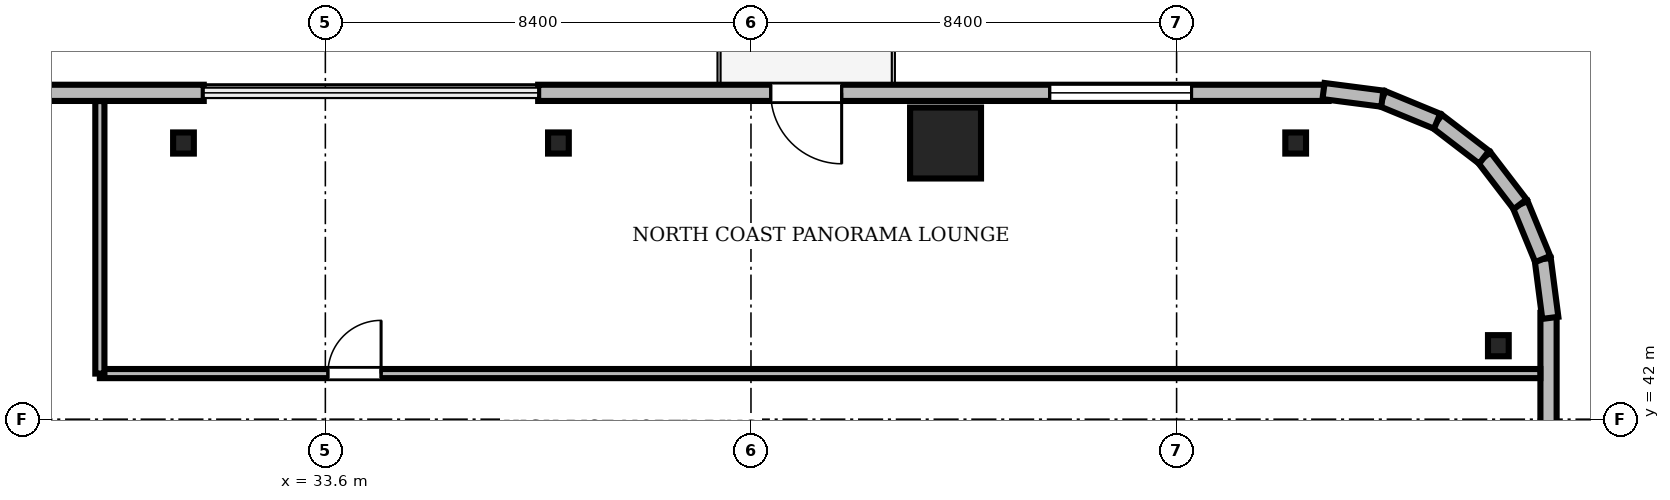
"""IFC4 building model, lengths in metres.
Left out: names, types, materials, properties, quantities, classifications, styles, units other than length and angle.
Written with IfcOpenShell. Run it as: python <this file> out.ifc"""

import sys

from ifc_helpers import new_model, si_unit, direction, frame, frame_2d, origin, origin_2d, place, context, subcontext, project, spatial, rectangle, i_section, extrude, source, transform, mapped, element, fill, save


model = new_model("IFC4")
c1 = context("Model", 3, precision=1e-05, world=origin(), true_north=direction((0.0, 1.0)))
c2 = subcontext(c1, "Body", "Model", "MODEL_VIEW")
j1 = project(units=[si_unit("LENGTHUNIT", "METRE"), si_unit("PLANEANGLEUNIT", "RADIAN")], contexts=[c1])
p1 = place(None, origin())
s1 = spatial("IfcSite", under=j1, at=p1, CompositionType="ELEMENT")
p2 = place(p1, origin())
s2 = spatial("IfcBuilding", under=s1, at=p2, CompositionType="ELEMENT")
p3 = place(p2, frame((0.0, 0.0, 218.55)))
s3 = spatial("IfcBuildingStorey", under=s2, at=p3, CompositionType="ELEMENT", Elevation=218.55)
m1 = source(origin(), c2, "Body", "SweptSolid", [
    extrude(rectangle(XDim=1.4, YDim=1.4, at=origin_2d()), origin(), (0.0, 0.0, 1.0), 3.53),
])
p4 = place(p3, frame((45.84, 47.45, 0.0), z_axis=(0.0, 0.0, 1.0), x_axis=(1.0, 0.0, 0.0)))
e1 = element("IfcColumn", 1, at=p4, inside=s3, PredefinedType="COLUMN", context=c2, shape_type="MappedRepresentation", body=[
    mapped(m1, transform((0.0, 0.0, 0.0), scale=1.0)),
])
m2 = source(origin(), c2, "Body", "SweptSolid", [
    extrude(i_section(OverallWidth=0.409, OverallDepth=0.417, WebThickness=0.021, FlangeThickness=0.033, FilletRadius=0.015, at=origin_2d()), origin(), (0.0, 0.0, 1.0), 3.53),
])
for number, where, z_axis, x_axis in (
    (2, (56.75, 43.45, 0.0), (0.0, 0.0, 1.0), (1.0, 0.0, 0.0)),
    (3, (52.75, 47.45, 0.0), (0.0, 0.0, 1.0), (1.0, 0.0, 0.0)),
    (4, (38.2, 47.45, 0.0), (0.0, 0.0, 1.0), (1.0, 0.0, 0.0)),
    (5, (30.8, 47.45, 0.0), (0.0, 0.0, 1.0), (1.0, 0.0, 0.0)),
):
    element("IfcColumn", number, at=place(p3, frame(where, z_axis=z_axis, x_axis=x_axis)), inside=s3, PredefinedType="COLUMN", context=c2, shape_type="MappedRepresentation", body=[
        mapped(m2, transform((0.0, 0.0, 0.0), scale=1.0)),
    ])
m3 = source(origin(), c2, "Body", "SweptSolid", [
    extrude(rectangle(XDim=15.6, YDim=0.32, at=frame_2d((7.8, 0.0))), origin(), (0.0, 0.0, 1.0), 3.53),
])
p5 = place(p3, frame((53.4, 48.44, 0.0), z_axis=(0.0, 0.0, 1.0), x_axis=(-1.0, 0.0, 0.0)))
e6 = element("IfcWall", 6, at=p5, inside=s3, PredefinedType="SOLIDWALL", context=c2, shape_type="MappedRepresentation", body=[
    mapped(m3, transform((0.0, 0.0, 0.0), scale=1.0)),
])
m4 = source(origin(), c2, "Body", "SweptSolid", [
    extrude(rectangle(XDim=1.4, YDim=2.3, at=frame_2d((0.7, 1.15))), frame((0.0, 0.17, 0.0), z_axis=(0.0, -1.0, 0.0), x_axis=(1.0, 0.0, 0.0)), (0.0, 0.0, 1.0), 0.34),
])
p6 = place(p5, frame((9.61, 0.0, 0.0)))
e7 = element("IfcOpeningElement", 7, at=p6, cuts=e6, PredefinedType="OPENING", context=c2, shape_type="MappedRepresentation", body=[
    mapped(m4, transform((0.0, 0.0, 0.0), scale=1.0)),
])
m5 = source(origin(), c2, "Body", "SweptSolid", [
    extrude(rectangle(XDim=2.8, YDim=2.4, at=frame_2d((1.4, 1.2))), frame((0.0, 0.17, 0.0), z_axis=(0.0, -1.0, 0.0), x_axis=(1.0, 0.0, 0.0)), (0.0, 0.0, 1.0), 0.34),
])
p7 = place(p5, frame((2.705, 0.0, 0.72)))
e8 = element("IfcOpeningElement", 8, at=p7, cuts=e6, PredefinedType="OPENING", context=c2, shape_type="MappedRepresentation", body=[
    mapped(m5, transform((0.0, 0.0, 0.0), scale=1.0)),
])
p8 = place(p3, frame((31.2, 48.44, 0.0), z_axis=(0.0, 0.0, 1.0), x_axis=(-1.0, 0.0, 0.0)))
e9 = element("IfcWall", 9, at=p8, inside=s3, PredefinedType="SOLIDWALL", context=c2, shape_type="MappedRepresentation", body=[
    mapped(m3, transform((0.0, 0.0, 0.0), scale=1.0)),
])
p9 = place(p8, frame((10.095, 0.0, 0.72)))
e10 = element("IfcOpeningElement", 10, at=p9, cuts=e9, PredefinedType="OPENING", context=c2, shape_type="MappedRepresentation", body=[
    mapped(m5, transform((0.0, 0.0, 0.0), scale=1.0)),
])
m6 = source(origin(), c2, "Body", "SweptSolid", [
    extrude(rectangle(XDim=15.6, YDim=0.32, at=frame_2d((7.8, 0.0))), origin(), (0.0, 0.0, 1.0), 3.53),
])
p10 = place(p3, frame((57.74, 28.5, 0.0), z_axis=(0.0, 0.0, 1.0), x_axis=(0.0, 1.0, 0.0)))
e11 = element("IfcWall", 11, at=p10, inside=s3, PredefinedType="SOLIDWALL", context=c2, shape_type="MappedRepresentation", body=[
    mapped(m6, transform((0.0, 0.0, 0.0), scale=1.0)),
])
p11 = place(p10, frame((10.095, 0.0, 0.72)))
e12 = element("IfcOpeningElement", 12, at=p11, cuts=e11, PredefinedType="OPENING", context=c2, shape_type="MappedRepresentation", body=[
    mapped(m5, transform((0.0, 0.0, 0.0), scale=1.0)),
])
m7 = source(origin(), c2, "Body", "SweptSolid", [
    extrude(rectangle(XDim=1.17, YDim=0.32, at=frame_2d((0.585, 0.0))), origin(), (0.0, 0.0, 1.0), 3.53),
])
p12 = place(p3, frame((57.776, 44.0, 0.0), z_axis=(0.0, 0.0, 1.0), x_axis=(-0.128295670475, 0.991735963317, 0.0)))
e13 = element("IfcWall", 13, at=p12, inside=s3, PredefinedType="SOLIDWALL", context=c2, shape_type="MappedRepresentation", body=[
    mapped(m7, transform((0.0, 0.0, 0.0), scale=1.0)),
])
m8 = source(origin(), c2, "Body", "SweptSolid", [
    extrude(rectangle(XDim=1.169, YDim=0.32, at=frame_2d((0.584, 0.0))), origin(), (0.0, 0.0, 1.0), 3.53),
])
p13 = place(p3, frame((57.625, 45.16, 0.0), z_axis=(0.0, 0.0, 1.0), x_axis=(-0.381054331552, 0.924552646638, 0.0)))
e14 = element("IfcWall", 14, at=p13, inside=s3, PredefinedType="SOLIDWALL", context=c2, shape_type="MappedRepresentation", body=[
    mapped(m8, transform((0.0, 0.0, 0.0), scale=1.0)),
])
m9 = source(origin(), c2, "Body", "SweptSolid", [
    extrude(rectangle(XDim=1.169, YDim=0.32, at=frame_2d((0.584, 0.0))), origin(), (0.0, 0.0, 1.0), 3.53),
])
p14 = place(p3, frame((57.18, 46.241, 0.0), z_axis=(0.0, 0.0, 1.0), x_axis=(-0.608387696831, 0.793639975269, 0.0)))
e15 = element("IfcWall", 15, at=p14, inside=s3, PredefinedType="SOLIDWALL", context=c2, shape_type="MappedRepresentation", body=[
    mapped(m9, transform((0.0, 0.0, 0.0), scale=1.0)),
])
m10 = source(origin(), c2, "Body", "SweptSolid", [
    extrude(rectangle(XDim=1.169, YDim=0.32, at=frame_2d((0.584, 0.0))), origin(), (0.0, 0.0, 1.0), 3.53),
])
p15 = place(p3, frame((56.469, 47.169, 0.0), z_axis=(0.0, 0.0, 1.0), x_axis=(-0.793663520347, 0.608356981114, 0.0)))
e16 = element("IfcWall", 16, at=p15, inside=s3, PredefinedType="SOLIDWALL", context=c2, shape_type="MappedRepresentation", body=[
    mapped(m10, transform((0.0, 0.0, 0.0), scale=1.0)),
])
p16 = place(p3, frame((55.541, 47.88, 0.0), z_axis=(0.0, 0.0, 1.0), x_axis=(-0.924552646638, 0.381054331552, 0.0)))
e17 = element("IfcWall", 17, at=p16, inside=s3, PredefinedType="SOLIDWALL", context=c2, shape_type="MappedRepresentation", body=[
    mapped(m8, transform((0.0, 0.0, 0.0), scale=1.0)),
])
p17 = place(p3, frame((54.46, 48.325, 0.0), z_axis=(0.0, 0.0, 1.0), x_axis=(-0.991735963317, 0.128295670475, 0.0)))
e18 = element("IfcWall", 18, at=p17, inside=s3, PredefinedType="SOLIDWALL", context=c2, shape_type="MappedRepresentation", body=[
    mapped(m7, transform((0.0, 0.0, 0.0), scale=1.0)),
])
m11 = source(origin(), c2, "Body", "SweptSolid", [
    extrude(rectangle(XDim=28.428, YDim=0.18, at=frame_2d((14.214, 0.0))), origin(), (0.0, 0.0, 1.0), 2.772),
])
p18 = place(p3, frame((29.15, 42.9, 0.0), z_axis=(0.0, 0.0, 1.0), x_axis=(1.0, 0.0, 0.0)))
e19 = element("IfcWall", 19, at=p18, inside=s3, PredefinedType="PARTITIONING", context=c2, shape_type="MappedRepresentation", body=[
    mapped(m11, transform((0.0, 0.0, 0.0), scale=1.0)),
])
m12 = source(origin(), c2, "Body", "SweptSolid", [
    extrude(rectangle(XDim=1.05, YDim=2.2, at=frame_2d((0.525, 1.1))), frame((0.0, 0.1, 0.0), z_axis=(0.0, -1.0, 0.0), x_axis=(1.0, 0.0, 0.0)), (0.0, 0.0, 1.0), 0.2),
])
p19 = place(p18, frame((4.5, 0.0, 0.0)))
e20 = element("IfcOpeningElement", 20, at=p19, cuts=e19, PredefinedType="OPENING", context=c2, shape_type="MappedRepresentation", body=[
    mapped(m12, transform((0.0, 0.0, 0.0), scale=1.0)),
])
m13 = source(origin(), c2, "Body", "SweptSolid", [
    extrude(rectangle(XDim=5.378, YDim=0.18, at=frame_2d((2.689, 0.0))), origin(), (0.0, 0.0, 1.0), 2.772),
])
p20 = place(p3, frame((29.15, 42.9, 0.0), z_axis=(0.0, 0.0, 1.0), x_axis=(0.0, 1.0, 0.0)))
e21 = element("IfcWall", 21, at=p20, inside=s3, PredefinedType="PARTITIONING", context=c2, shape_type="MappedRepresentation", body=[
    mapped(m13, transform((0.0, 0.0, 0.0), scale=1.0)),
])
m14 = source(origin(), c2, "Body", "SweptSolid", [
    extrude(rectangle(XDim=1.4, YDim=2.3, at=frame_2d((0.7, 1.15))), frame((0.0, 0.025, 0.0), z_axis=(0.0, -1.0, 0.0), x_axis=(1.0, 0.0, 0.0)), (0.0, 0.0, 1.0), 0.05),
])
p21 = place(p6, frame((1.4, 0.0, 0.0), z_axis=(0.0, 0.0, 1.0), x_axis=(-1.0, 0.0, 0.0)))
e22 = element("IfcDoor", 22, at=p21, inside=s3, OperationType="DOUBLE_DOOR_SLIDING", PredefinedType="DOOR", context=c2, shape_type="MappedRepresentation", body=[
    mapped(m14, transform((0.0, 0.0, 0.0), scale=1.0)),
])
fill(e7, e22)
m15 = source(origin(), c2, "Body", "SweptSolid", [
    extrude(rectangle(XDim=2.8, YDim=2.4, at=frame_2d((1.4, 1.2))), frame((0.0, 0.03, 0.0), z_axis=(0.0, -1.0, 0.0), x_axis=(1.0, 0.0, 0.0)), (0.0, 0.0, 1.0), 0.06),
])
p22 = place(p7, origin())
e23 = element("IfcWindow", 23, at=p22, inside=s3, PartitioningType="SINGLE_PANEL", PredefinedType="WINDOW", context=c2, shape_type="MappedRepresentation", body=[
    mapped(m15, transform((0.0, 0.0, 0.0), scale=1.0)),
])
fill(e8, e23)
m16 = source(origin(), c2, "Body", "SweptSolid", [
    extrude(rectangle(XDim=1.05, YDim=2.2, at=frame_2d((0.525, 1.1))), frame((0.0, 0.025, 0.0), z_axis=(0.0, -1.0, 0.0), x_axis=(1.0, 0.0, 0.0)), (0.0, 0.0, 1.0), 0.05),
])
p23 = place(p19, origin())
e24 = element("IfcDoor", 24, at=p23, inside=s3, OperationType="SINGLE_SWING_RIGHT", PredefinedType="DOOR", context=c2, shape_type="MappedRepresentation", body=[
    mapped(m16, transform((0.0, 0.0, 0.0), scale=1.0)),
])
fill(e20, e24)
save(model, sys.argv[1])
